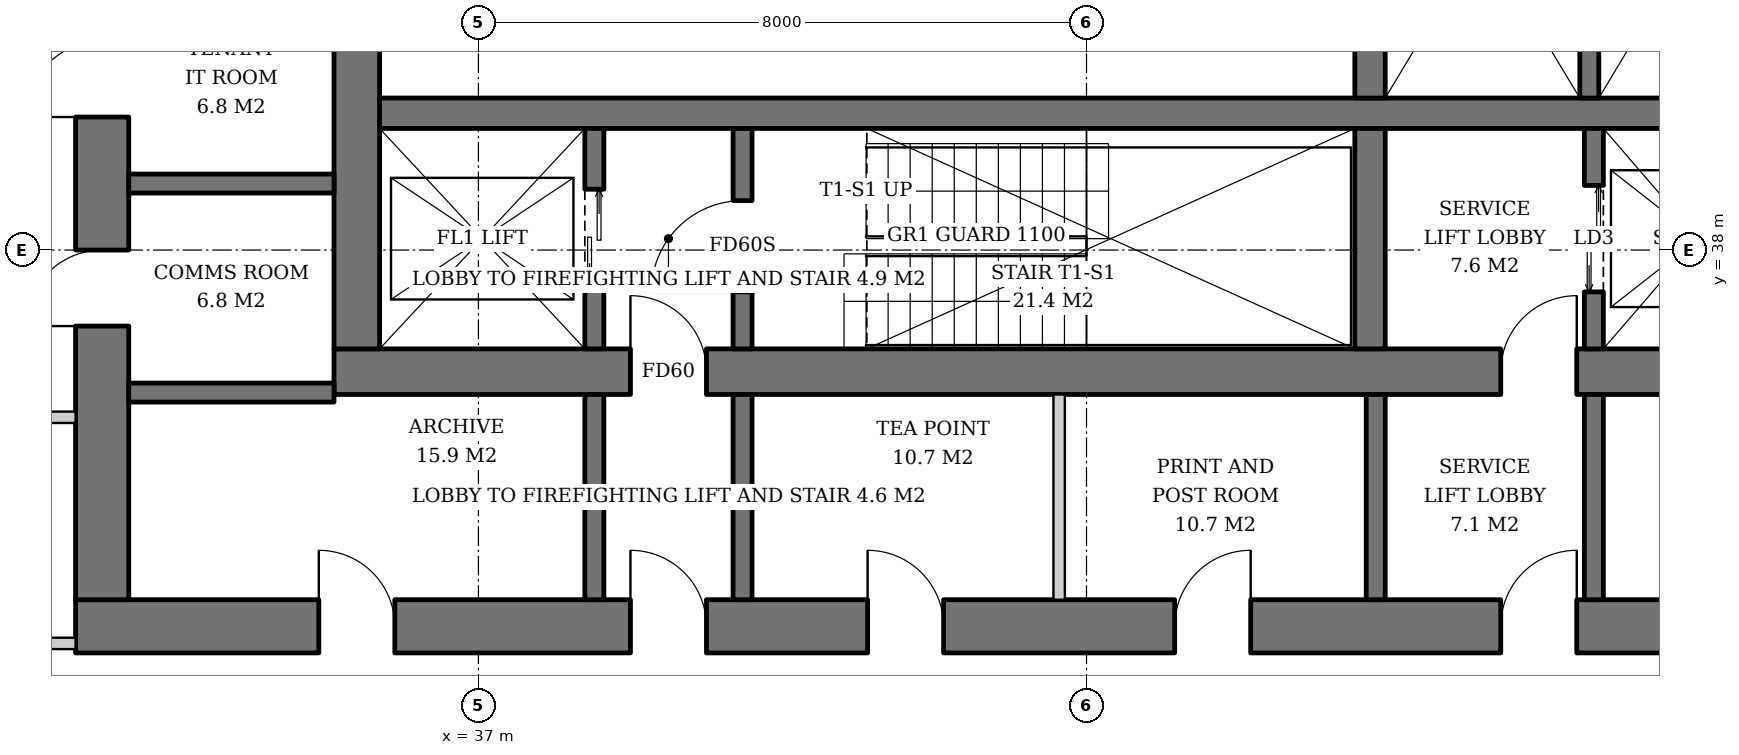
"""IFC4 building model, lengths in metres.
Left out: names, types, materials, properties, quantities, classifications, styles, units other than length and angle.
Written with IfcOpenShell. Run it as: python <this file> out.ifc"""

import sys

from ifc_helpers import new_model, si_unit, direction, frame, frame_2d, origin, place, context, subcontext, project, spatial, rectangle, extrude, element, fill, save


model = new_model("IFC4")
c1 = context("Model", 3, precision=1e-05, world=origin(), true_north=direction((0.0, 1.0)))
c2 = subcontext(c1, "Body", "Model", "MODEL_VIEW")
j1 = project(units=[si_unit("LENGTHUNIT", "METRE"), si_unit("PLANEANGLEUNIT", "RADIAN")], contexts=[c1])
p1 = place(None, origin())
s1 = spatial("IfcSite", under=j1, at=p1, CompositionType="ELEMENT")
p2 = place(p1, origin())
s2 = spatial("IfcBuilding", under=s1, at=p2, CompositionType="ELEMENT")
p3 = place(p2, frame((0.0, 0.0, 131.2)))
s3 = spatial("IfcBuildingStorey", under=s2, at=p3, CompositionType="ELEMENT", Elevation=131.2)
p4 = place(p3, frame((35.1, 36.4, 0.0), z_axis=(0.0, 0.0, 1.0), x_axis=(1.0, 0.0, 0.0)))
e1 = element("IfcWall", 1, at=p4, inside=s3, PredefinedType="SHEAR", context=c2, shape_type="SweptSolid", body=[
    extrude(rectangle(XDim=19.8, YDim=0.6, at=frame_2d((9.9, 0.0))), origin(), (0.0, 0.0, 1.0), 3.8),
])
p5 = place(p4, frame((3.9, 0.0, 0.0)))
e2 = element("IfcOpeningElement", 2, at=p5, cuts=e1, PredefinedType="OPENING", context=c2, shape_type="SweptSolid", body=[
    extrude(rectangle(XDim=1.0, YDim=2.1, at=frame_2d((0.5, 1.05))), frame((0.0, 0.31, 0.0), z_axis=(0.0, -1.0, 0.0), x_axis=(1.0, 0.0, 0.0)), (0.0, 0.0, 1.0), 0.62),
])
p6 = place(p4, frame((15.35, 0.0, 0.0)))
e3 = element("IfcOpeningElement", 3, at=p6, cuts=e1, PredefinedType="OPENING", context=c2, shape_type="SweptSolid", body=[
    extrude(rectangle(XDim=1.0, YDim=2.1, at=frame_2d((0.5, 1.05))), frame((0.0, 0.31, 0.0), z_axis=(0.0, -1.0, 0.0), x_axis=(1.0, 0.0, 0.0)), (0.0, 0.0, 1.0), 0.62),
])
p7 = place(p3, frame((35.4, 36.7, 0.0), z_axis=(0.0, 0.0, 1.0), x_axis=(0.0, 1.0, 0.0)))
e4 = element("IfcWall", 4, at=p7, inside=s3, PredefinedType="SHEAR", context=c2, shape_type="SweptSolid", body=[
    extrude(rectangle(XDim=18.6, YDim=0.6, at=frame_2d((9.3, 0.0))), origin(), (0.0, 0.0, 1.0), 3.8),
])
p8 = place(p7, frame((8.4, 0.0, 0.0)))
e5 = element("IfcOpeningElement", 5, at=p8, cuts=e4, PredefinedType="OPENING", context=c2, shape_type="SweptSolid", body=[
    extrude(rectangle(XDim=1.8, YDim=2.4, at=frame_2d((0.9, 1.2))), frame((0.0, 0.31, 0.0), z_axis=(0.0, -1.0, 0.0), x_axis=(1.0, 0.0, 0.0)), (0.0, 0.0, 1.0), 0.62),
])
p9 = place(p3, frame((31.7, 33.05, 0.0), z_axis=(0.0, 0.0, 1.0), x_axis=(1.0, 0.0, 0.0)))
e6 = element("IfcWall", 6, at=p9, inside=s3, PredefinedType="SHEAR", context=c2, shape_type="SweptSolid", body=[
    extrude(rectangle(XDim=26.6, YDim=0.7, at=frame_2d((13.3, 0.0))), origin(), (0.0, 0.0, 1.0), 3.8),
])
p10 = place(p9, frame((7.3, 0.0, 0.0)))
e7 = element("IfcOpeningElement", 7, at=p10, cuts=e6, PredefinedType="OPENING", context=c2, shape_type="SweptSolid", body=[
    extrude(rectangle(XDim=1.0, YDim=2.1, at=frame_2d((0.5, 1.05))), frame((0.0, 0.36, 0.0), z_axis=(0.0, -1.0, 0.0), x_axis=(1.0, 0.0, 0.0)), (0.0, 0.0, 1.0), 0.72),
])
p11 = place(p9, frame((18.75, 0.0, 0.0)))
e8 = element("IfcOpeningElement", 8, at=p11, cuts=e6, PredefinedType="OPENING", context=c2, shape_type="SweptSolid", body=[
    extrude(rectangle(XDim=1.0, YDim=2.1, at=frame_2d((0.5, 1.05))), frame((0.0, 0.36, 0.0), z_axis=(0.0, -1.0, 0.0), x_axis=(1.0, 0.0, 0.0)), (0.0, 0.0, 1.0), 0.72),
])
p12 = place(p9, frame((3.2, 0.0, 0.0)))
e9 = element("IfcOpeningElement", 9, at=p12, cuts=e6, PredefinedType="OPENING", context=c2, shape_type="SweptSolid", body=[
    extrude(rectangle(XDim=1.0, YDim=2.1, at=frame_2d((0.5, 1.05))), frame((0.0, 0.36, 0.0), z_axis=(0.0, -1.0, 0.0), x_axis=(1.0, 0.0, 0.0)), (0.0, 0.0, 1.0), 0.72),
])
p13 = place(p9, frame((10.42, 0.0, 0.0)))
e10 = element("IfcOpeningElement", 10, at=p13, cuts=e6, PredefinedType="OPENING", context=c2, shape_type="SweptSolid", body=[
    extrude(rectangle(XDim=1.0, YDim=2.1, at=frame_2d((0.5, 1.05))), frame((0.0, 0.36, 0.0), z_axis=(0.0, -1.0, 0.0), x_axis=(1.0, 0.0, 0.0)), (0.0, 0.0, 1.0), 0.72),
])
p14 = place(p9, frame((14.46, 0.0, 0.0)))
e11 = element("IfcOpeningElement", 11, at=p14, cuts=e6, PredefinedType="OPENING", context=c2, shape_type="SweptSolid", body=[
    extrude(rectangle(XDim=1.0, YDim=2.1, at=frame_2d((0.5, 1.05))), frame((0.0, 0.36, 0.0), z_axis=(0.0, -1.0, 0.0), x_axis=(1.0, 0.0, 0.0)), (0.0, 0.0, 1.0), 0.72),
])
p15 = place(p9, frame((22.5, 0.0, 0.0)))
e12 = element("IfcOpeningElement", 12, at=p15, cuts=e6, PredefinedType="OPENING", context=c2, shape_type="SweptSolid", body=[
    extrude(rectangle(XDim=1.0, YDim=2.1, at=frame_2d((0.5, 1.05))), frame((0.0, 0.36, 0.0), z_axis=(0.0, -1.0, 0.0), x_axis=(1.0, 0.0, 0.0)), (0.0, 0.0, 1.0), 0.72),
])
p16 = place(p3, frame((32.05, 33.4, 0.0), z_axis=(0.0, 0.0, 1.0), x_axis=(0.0, 1.0, 0.0)))
e13 = element("IfcWall", 13, at=p16, inside=s3, PredefinedType="SHEAR", context=c2, shape_type="SweptSolid", body=[
    extrude(rectangle(XDim=25.2, YDim=0.7, at=frame_2d((12.6, 0.0))), origin(), (0.0, 0.0, 1.0), 3.8),
])
p17 = place(p16, frame((11.7, 0.0, 0.0)))
e14 = element("IfcOpeningElement", 14, at=p17, cuts=e13, PredefinedType="OPENING", context=c2, shape_type="SweptSolid", body=[
    extrude(rectangle(XDim=1.8, YDim=2.4, at=frame_2d((0.9, 1.2))), frame((0.0, 0.36, 0.0), z_axis=(0.0, -1.0, 0.0), x_axis=(1.0, 0.0, 0.0)), (0.0, 0.0, 1.0), 0.72),
])
p18 = place(p16, frame((3.6, 0.0, 0.0)))
e15 = element("IfcOpeningElement", 15, at=p18, cuts=e13, PredefinedType="OPENING", context=c2, shape_type="SweptSolid", body=[
    extrude(rectangle(XDim=1.0, YDim=2.1, at=frame_2d((0.5, 1.05))), frame((0.0, 0.36, 0.0), z_axis=(0.0, -1.0, 0.0), x_axis=(1.0, 0.0, 0.0)), (0.0, 0.0, 1.0), 0.72),
])
p19 = place(p16, frame((6.35, 0.0, 0.0)))
e16 = element("IfcOpeningElement", 16, at=p19, cuts=e13, PredefinedType="OPENING", context=c2, shape_type="SweptSolid", body=[
    extrude(rectangle(XDim=1.0, YDim=2.1, at=frame_2d((0.5, 1.05))), frame((0.0, 0.36, 0.0), z_axis=(0.0, -1.0, 0.0), x_axis=(1.0, 0.0, 0.0)), (0.0, 0.0, 1.0), 0.72),
])
p20 = place(p16, frame((9.1, 0.0, 0.0)))
e17 = element("IfcOpeningElement", 17, at=p20, cuts=e13, PredefinedType="OPENING", context=c2, shape_type="SweptSolid", body=[
    extrude(rectangle(XDim=1.0, YDim=2.1, at=frame_2d((0.5, 1.05))), frame((0.0, 0.36, 0.0), z_axis=(0.0, -1.0, 0.0), x_axis=(1.0, 0.0, 0.0)), (0.0, 0.0, 1.0), 0.72),
])
p21 = place(p16, frame((15.1, 0.0, 0.0)))
e18 = element("IfcOpeningElement", 18, at=p21, cuts=e13, PredefinedType="OPENING", context=c2, shape_type="SweptSolid", body=[
    extrude(rectangle(XDim=1.0, YDim=2.1, at=frame_2d((0.5, 1.05))), frame((0.0, 0.36, 0.0), z_axis=(0.0, -1.0, 0.0), x_axis=(1.0, 0.0, 0.0)), (0.0, 0.0, 1.0), 0.72),
])
p22 = place(p16, frame((17.85, 0.0, 0.0)))
e19 = element("IfcOpeningElement", 19, at=p22, cuts=e13, PredefinedType="OPENING", context=c2, shape_type="SweptSolid", body=[
    extrude(rectangle(XDim=1.0, YDim=2.1, at=frame_2d((0.5, 1.05))), frame((0.0, 0.36, 0.0), z_axis=(0.0, -1.0, 0.0), x_axis=(1.0, 0.0, 0.0)), (0.0, 0.0, 1.0), 0.72),
])
p23 = place(p3, frame((35.7, 39.8, 0.0), z_axis=(0.0, 0.0, 1.0), x_axis=(1.0, 0.0, 0.0)))
e20 = element("IfcWall", 20, at=p23, inside=s3, PredefinedType="SHEAR", context=c2, shape_type="SweptSolid", body=[
    extrude(rectangle(XDim=18.6, YDim=0.4, at=frame_2d((9.3, 0.0))), origin(), (0.0, 0.0, 1.0), 3.8),
])
p24 = place(p3, frame((48.73, 36.7, 0.0), z_axis=(0.0, 0.0, 1.0), x_axis=(0.0, 1.0, 0.0)))
e21 = element("IfcWall", 21, at=p24, inside=s3, PredefinedType="SHEAR", context=c2, shape_type="SweptSolid", body=[
    extrude(rectangle(XDim=2.9, YDim=0.4, at=frame_2d((1.45, 0.0))), origin(), (0.0, 0.0, 1.0), 3.8),
])
p25 = place(p3, frame((48.73, 40.0, 0.0), z_axis=(0.0, 0.0, 1.0), x_axis=(0.0, 1.0, 0.0)))
e22 = element("IfcWall", 22, at=p25, inside=s3, PredefinedType="SHEAR", context=c2, shape_type="SweptSolid", body=[
    extrude(rectangle(XDim=12.0, YDim=0.4, at=frame_2d((6.0, 0.0))), origin(), (0.0, 0.0, 1.0), 3.8),
])
p26 = place(p3, frame((38.525, 36.7, 0.0), z_axis=(0.0, 0.0, 1.0), x_axis=(0.0, 1.0, 0.0)))
e23 = element("IfcWall", 23, at=p26, inside=s3, PredefinedType="SHEAR", context=c2, shape_type="SweptSolid", body=[
    extrude(rectangle(XDim=2.9, YDim=0.25, at=frame_2d((1.45, 0.0))), origin(), (0.0, 0.0, 1.0), 3.8),
])
p27 = place(p26, frame((0.8, 0.0, 0.0)))
e24 = element("IfcOpeningElement", 24, at=p27, cuts=e23, PredefinedType="OPENING", context=c2, shape_type="SweptSolid", body=[
    extrude(rectangle(XDim=1.3, YDim=2.2, at=frame_2d((0.65, 1.1))), frame((0.0, 0.135, 0.0), z_axis=(0.0, -1.0, 0.0), x_axis=(1.0, 0.0, 0.0)), (0.0, 0.0, 1.0), 0.27),
])
p28 = place(p3, frame((40.475, 36.7, 0.0), z_axis=(0.0, 0.0, 1.0), x_axis=(0.0, 1.0, 0.0)))
e25 = element("IfcWall", 25, at=p28, inside=s3, PredefinedType="SHEAR", context=c2, shape_type="SweptSolid", body=[
    extrude(rectangle(XDim=2.9, YDim=0.25, at=frame_2d((1.45, 0.0))), origin(), (0.0, 0.0, 1.0), 3.8),
])
p29 = place(p28, frame((0.75, 0.0, 0.0)))
e26 = element("IfcOpeningElement", 26, at=p29, cuts=e25, PredefinedType="OPENING", context=c2, shape_type="SweptSolid", body=[
    extrude(rectangle(XDim=1.2, YDim=2.1, at=frame_2d((0.6, 1.05))), frame((0.0, 0.135, 0.0), z_axis=(0.0, -1.0, 0.0), x_axis=(1.0, 0.0, 0.0)), (0.0, 0.0, 1.0), 0.27),
])
p30 = place(p3, frame((51.675, 36.7, 0.0), z_axis=(0.0, 0.0, 1.0), x_axis=(0.0, 1.0, 0.0)))
e27 = element("IfcWall", 27, at=p30, inside=s3, PredefinedType="SHEAR", context=c2, shape_type="SweptSolid", body=[
    extrude(rectangle(XDim=2.9, YDim=0.25, at=frame_2d((1.45, 0.0))), origin(), (0.0, 0.0, 1.0), 3.8),
])
p31 = place(p30, frame((0.75, 0.0, 0.0)))
e28 = element("IfcOpeningElement", 28, at=p31, cuts=e27, PredefinedType="OPENING", context=c2, shape_type="SweptSolid", body=[
    extrude(rectangle(XDim=1.4, YDim=2.4, at=frame_2d((0.7, 1.2))), frame((0.0, 0.135, 0.0), z_axis=(0.0, -1.0, 0.0), x_axis=(1.0, 0.0, 0.0)), (0.0, 0.0, 1.0), 0.27),
])
p32 = place(p3, frame((51.615, 44.25, 0.0), z_axis=(0.0, 0.0, 1.0), x_axis=(0.0, -1.0, 0.0)))
e29 = element("IfcWall", 29, at=p32, inside=s3, PredefinedType="SHEAR", context=c2, shape_type="SweptSolid", body=[
    extrude(rectangle(XDim=4.25, YDim=0.25, at=frame_2d((2.125, 0.0))), origin(), (0.0, 0.0, 1.0), 3.8),
])
for number, where, z_axis, x_axis in (
    (30, (32.4, 36.125, 0.0), (0.0, 0.0, 1.0), (1.0, 0.0, 0.0)),
    (31, (32.4, 38.875, 0.0), (0.0, 0.0, 1.0), (1.0, 0.0, 0.0)),
):
    element("IfcWall", number, at=place(p3, frame(where, z_axis=z_axis, x_axis=x_axis)), inside=s3, PredefinedType="SHEAR", context=c2, shape_type="SweptSolid", body=[
        extrude(rectangle(XDim=2.7, YDim=0.25, at=frame_2d((1.35, 0.0))), origin(), (0.0, 0.0, 1.0), 3.8),
    ])
for number, where, z_axis, x_axis in (
    (32, (38.525, 33.4, 0.0), (0.0, 0.0, 1.0), (0.0, 1.0, 0.0)),
    (33, (40.475, 33.4, 0.0), (0.0, 0.0, 1.0), (0.0, 1.0, 0.0)),
    (34, (48.805, 33.4, 0.0), (0.0, 0.0, 1.0), (0.0, 1.0, 0.0)),
    (35, (51.675, 33.4, 0.0), (0.0, 0.0, 1.0), (0.0, 1.0, 0.0)),
):
    element("IfcWall", number, at=place(p3, frame(where, z_axis=z_axis, x_axis=x_axis)), inside=s3, PredefinedType="SOLIDWALL", context=c2, shape_type="SweptSolid", body=[
        extrude(rectangle(XDim=2.7, YDim=0.25, at=frame_2d((1.35, 0.0))), origin(), (0.0, 0.0, 1.0), 3.62),
    ])
p33 = place(p3, frame((44.64, 33.4, 0.0), z_axis=(0.0, 0.0, 1.0), x_axis=(0.0, 1.0, 0.0)))
e36 = element("IfcWall", 36, at=p33, inside=s3, PredefinedType="SOLIDWALL", context=c2, shape_type="SweptSolid", body=[
    extrude(rectangle(XDim=2.7, YDim=0.15, at=frame_2d((1.35, 0.0))), origin(), (0.0, 0.0, 1.0), 3.62),
])
for number, where, z_axis, x_axis in (
    (37, (31.7, 35.8, 0.0), (0.0, 0.0, 1.0), (-1.0, 0.0, 0.0)),
    (38, (31.7, 32.825, 0.0), (0.0, 0.0, 1.0), (-1.0, 0.0, 0.0)),
):
    element("IfcWall", number, at=place(p3, frame(where, z_axis=z_axis, x_axis=x_axis)), inside=s3, PredefinedType="PARTITIONING", context=c2, shape_type="SweptSolid", body=[
        extrude(rectangle(XDim=2.925, YDim=0.15, at=frame_2d((1.462, 0.0))), origin(), (0.0, 0.0, 1.0), 3.62),
    ])
p34 = place(p27, origin())
e39 = element("IfcDoor", 39, at=p34, inside=s3, OperationType="DOUBLE_DOOR_SLIDING", PredefinedType="DOOR", context=c2, shape_type="SweptSolid", body=[
    extrude(rectangle(XDim=1.3, YDim=2.2, at=frame_2d((0.65, 1.1))), frame((0.0, 0.025, 0.0), z_axis=(0.0, -1.0, 0.0), x_axis=(1.0, 0.0, 0.0)), (0.0, 0.0, 1.0), 0.05),
])
fill(e24, e39)
p35 = place(p29, origin())
e40 = element("IfcDoor", 40, at=p35, inside=s3, OperationType="SINGLE_SWING_LEFT", PredefinedType="DOOR", context=c2, shape_type="SweptSolid", body=[
    extrude(rectangle(XDim=1.2, YDim=2.1, at=frame_2d((0.6, 1.05))), frame((0.0, 0.025, 0.0), z_axis=(0.0, -1.0, 0.0), x_axis=(1.0, 0.0, 0.0)), (0.0, 0.0, 1.0), 0.05),
])
fill(e26, e40)
p36 = place(p31, origin())
e41 = element("IfcDoor", 41, at=p36, inside=s3, OperationType="DOUBLE_DOOR_SLIDING", PredefinedType="DOOR", context=c2, shape_type="SweptSolid", body=[
    extrude(rectangle(XDim=1.4, YDim=2.4, at=frame_2d((0.7, 1.2))), frame((0.0, 0.025, 0.0), z_axis=(0.0, -1.0, 0.0), x_axis=(1.0, 0.0, 0.0)), (0.0, 0.0, 1.0), 0.05),
])
fill(e28, e41)
p37 = place(p5, origin())
e42 = element("IfcDoor", 42, at=p37, inside=s3, OperationType="SINGLE_SWING_LEFT", PredefinedType="DOOR", context=c2, shape_type="SweptSolid", body=[
    extrude(rectangle(XDim=1.0, YDim=2.1, at=frame_2d((0.5, 1.05))), frame((0.0, 0.025, 0.0), z_axis=(0.0, -1.0, 0.0), x_axis=(1.0, 0.0, 0.0)), (0.0, 0.0, 1.0), 0.05),
])
fill(e2, e42)
p38 = place(p6, origin())
e43 = element("IfcDoor", 43, at=p38, inside=s3, OperationType="SINGLE_SWING_RIGHT", PredefinedType="DOOR", context=c2, shape_type="SweptSolid", body=[
    extrude(rectangle(XDim=1.0, YDim=2.1, at=frame_2d((0.5, 1.05))), frame((0.0, 0.025, 0.0), z_axis=(0.0, -1.0, 0.0), x_axis=(1.0, 0.0, 0.0)), (0.0, 0.0, 1.0), 0.05),
])
fill(e3, e43)
p39 = place(p10, origin())
e44 = element("IfcDoor", 44, at=p39, inside=s3, OperationType="SINGLE_SWING_LEFT", PredefinedType="DOOR", context=c2, shape_type="SweptSolid", body=[
    extrude(rectangle(XDim=1.0, YDim=2.1, at=frame_2d((0.5, 1.05))), frame((0.0, 0.025, 0.0), z_axis=(0.0, -1.0, 0.0), x_axis=(1.0, 0.0, 0.0)), (0.0, 0.0, 1.0), 0.05),
])
fill(e7, e44)
p40 = place(p11, origin())
e45 = element("IfcDoor", 45, at=p40, inside=s3, OperationType="SINGLE_SWING_RIGHT", PredefinedType="DOOR", context=c2, shape_type="SweptSolid", body=[
    extrude(rectangle(XDim=1.0, YDim=2.1, at=frame_2d((0.5, 1.05))), frame((0.0, 0.025, 0.0), z_axis=(0.0, -1.0, 0.0), x_axis=(1.0, 0.0, 0.0)), (0.0, 0.0, 1.0), 0.05),
])
fill(e8, e45)
p41 = place(p18, origin())
e46 = element("IfcDoor", 46, at=p41, inside=s3, OperationType="SINGLE_SWING_LEFT", PredefinedType="DOOR", context=c2, shape_type="SweptSolid", body=[
    extrude(rectangle(XDim=1.0, YDim=2.1, at=frame_2d((0.5, 1.05))), frame((0.0, -0.29, 0.0), z_axis=(0.0, -1.0, 0.0), x_axis=(1.0, 0.0, 0.0)), (0.0, 0.0, 1.0), 0.05),
])
fill(e15, e46)
p42 = place(p19, origin())
e47 = element("IfcDoor", 47, at=p42, inside=s3, OperationType="SINGLE_SWING_LEFT", PredefinedType="DOOR", context=c2, shape_type="SweptSolid", body=[
    extrude(rectangle(XDim=1.0, YDim=2.1, at=frame_2d((0.5, 1.05))), frame((0.0, -0.29, 0.0), z_axis=(0.0, -1.0, 0.0), x_axis=(1.0, 0.0, 0.0)), (0.0, 0.0, 1.0), 0.05),
])
fill(e16, e47)
p43 = place(p12, origin())
e48 = element("IfcDoor", 48, at=p43, inside=s3, OperationType="SINGLE_SWING_LEFT", PredefinedType="DOOR", context=c2, shape_type="SweptSolid", body=[
    extrude(rectangle(XDim=1.0, YDim=2.1, at=frame_2d((0.5, 1.05))), frame((0.0, 0.34, 0.0), z_axis=(0.0, -1.0, 0.0), x_axis=(1.0, 0.0, 0.0)), (0.0, 0.0, 1.0), 0.05),
])
fill(e9, e48)
p44 = place(p13, origin())
e49 = element("IfcDoor", 49, at=p44, inside=s3, OperationType="SINGLE_SWING_LEFT", PredefinedType="DOOR", context=c2, shape_type="SweptSolid", body=[
    extrude(rectangle(XDim=1.0, YDim=2.1, at=frame_2d((0.5, 1.05))), frame((0.0, 0.34, 0.0), z_axis=(0.0, -1.0, 0.0), x_axis=(1.0, 0.0, 0.0)), (0.0, 0.0, 1.0), 0.05),
])
fill(e10, e49)
p45 = place(p14, origin())
e50 = element("IfcDoor", 50, at=p45, inside=s3, OperationType="SINGLE_SWING_RIGHT", PredefinedType="DOOR", context=c2, shape_type="SweptSolid", body=[
    extrude(rectangle(XDim=1.0, YDim=2.1, at=frame_2d((0.5, 1.05))), frame((0.0, 0.34, 0.0), z_axis=(0.0, -1.0, 0.0), x_axis=(1.0, 0.0, 0.0)), (0.0, 0.0, 1.0), 0.05),
])
fill(e11, e50)
save(model, sys.argv[1])
